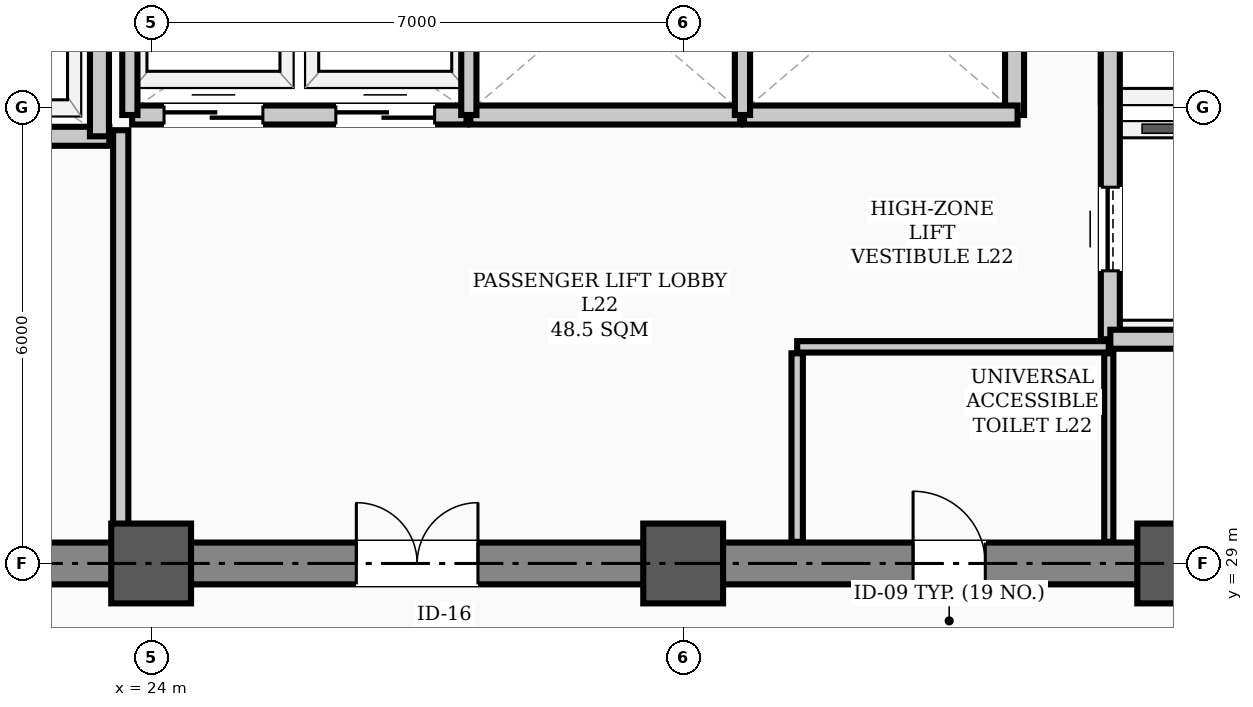
"""IFC4 building model, lengths in metres.
Left out: names, types, materials, properties, quantities, classifications, styles, units other than length and angle.
Written with IfcOpenShell. Run it as: python <this file> out.ifc"""

import sys

from ifc_helpers import new_model, si_unit, direction, frame, frame_2d, origin, origin_2d, place, context, subcontext, project, spatial, rectangle, hollow_rectangle, extrude, element, fill, save


model = new_model("IFC4")
c1 = context("Model", 3, precision=1e-05, world=origin(), true_north=direction((0.0, 1.0)))
c2 = subcontext(c1, "Body", "Model", "MODEL_VIEW")
j1 = project(units=[si_unit("LENGTHUNIT", "METRE"), si_unit("PLANEANGLEUNIT", "RADIAN")], contexts=[c1])
p1 = place(None, origin())
s1 = spatial("IfcSite", under=j1, at=p1, CompositionType="ELEMENT")
p2 = place(p1, origin())
s2 = spatial("IfcBuilding", under=s1, at=p2, CompositionType="ELEMENT")
p3 = place(p2, frame((0.0, 0.0, 88.9)))
s3 = spatial("IfcBuildingStorey", under=s2, at=p3, CompositionType="ELEMENT", Elevation=88.9)
for number, where, z_axis, x_axis in (
    (1, (24.0, 29.0, 0.0), (0.0, 0.0, 1.0), (1.0, 0.0, 0.0)),
    (2, (31.0, 29.0, 0.0), (0.0, 0.0, 1.0), (1.0, 0.0, 0.0)),
    (3, (37.5, 29.0, 0.0), (0.0, 0.0, 1.0), (1.0, 0.0, 0.0)),
):
    element("IfcColumn", number, at=place(p3, frame(where, z_axis=z_axis, x_axis=x_axis)), inside=s3, PredefinedType="COLUMN", context=c2, shape_type="SweptSolid", body=[
        extrude(hollow_rectangle(XDim=1.05, YDim=1.05, WallThickness=0.038, InnerFilletRadius=0.019, OuterFilletRadius=0.057, at=origin_2d()), origin(), (0.0, 0.0, 1.0), 3.9),
    ])
p4 = place(p3, frame((13.5, 29.0, 0.0), z_axis=(0.0, 0.0, 1.0), x_axis=(1.0, 0.0, 0.0)))
e4 = element("IfcWall", 4, at=p4, inside=s3, PredefinedType="SHEAR", context=c2, shape_type="SweptSolid", body=[
    extrude(rectangle(XDim=30.5, YDim=0.55, at=frame_2d((15.25, 0.0))), origin(), (0.0, 0.0, 1.0), 3.72),
])
p5 = place(p4, frame((1.75, 0.0, 0.0)))
e5 = element("IfcOpeningElement", 5, at=p5, cuts=e4, PredefinedType="OPENING", context=c2, shape_type="SweptSolid", body=[
    extrude(rectangle(XDim=1.1, YDim=2.08, at=frame_2d((0.55, 1.04))), frame((0.0, 0.285, 0.0), z_axis=(0.0, -1.0, 0.0), x_axis=(1.0, 0.0, 0.0)), (0.0, 0.0, 1.0), 0.57),
])
p6 = place(p4, frame((26.7, 0.0, 0.0)))
e6 = element("IfcOpeningElement", 6, at=p6, cuts=e4, PredefinedType="OPENING", context=c2, shape_type="SweptSolid", body=[
    extrude(rectangle(XDim=1.1, YDim=2.08, at=frame_2d((0.55, 1.04))), frame((0.0, 0.285, 0.0), z_axis=(0.0, -1.0, 0.0), x_axis=(1.0, 0.0, 0.0)), (0.0, 0.0, 1.0), 0.57),
])
p7 = place(p4, frame((6.8, 0.0, 0.0)))
e7 = element("IfcOpeningElement", 7, at=p7, cuts=e4, PredefinedType="OPENING", context=c2, shape_type="SweptSolid", body=[
    extrude(rectangle(XDim=1.1, YDim=2.08, at=frame_2d((0.55, 1.04))), frame((0.0, 0.285, 0.0), z_axis=(0.0, -1.0, 0.0), x_axis=(1.0, 0.0, 0.0)), (0.0, 0.0, 1.0), 0.57),
])
p8 = place(p4, frame((13.2, 0.0, 0.0)))
e8 = element("IfcOpeningElement", 8, at=p8, cuts=e4, PredefinedType="OPENING", context=c2, shape_type="SweptSolid", body=[
    extrude(rectangle(XDim=1.6, YDim=2.08, at=frame_2d((0.8, 1.04))), frame((0.0, 0.285, 0.0), z_axis=(0.0, -1.0, 0.0), x_axis=(1.0, 0.0, 0.0)), (0.0, 0.0, 1.0), 0.57),
])
p9 = place(p4, frame((20.525, 0.0, 0.0)))
e9 = element("IfcOpeningElement", 9, at=p9, cuts=e4, PredefinedType="OPENING", context=c2, shape_type="SweptSolid", body=[
    extrude(rectangle(XDim=0.95, YDim=2.08, at=frame_2d((0.475, 1.04))), frame((0.0, 0.285, 0.0), z_axis=(0.0, -1.0, 0.0), x_axis=(1.0, 0.0, 0.0)), (0.0, 0.0, 1.0), 0.57),
])
p10 = place(p3, frame((18.1, 34.62, 0.0), z_axis=(0.0, 0.0, 1.0), x_axis=(1.0, 0.0, 0.0)))
e10 = element("IfcWall", 10, at=p10, inside=s3, PredefinedType="STANDARD", context=c2, shape_type="SweptSolid", body=[
    extrude(rectangle(XDim=5.35, YDim=0.25, at=frame_2d((2.675, 0.0))), origin(), (0.0, 0.0, 1.0), 3.72),
])
p11 = place(p10, frame((0.85, 0.0, 0.0)))
e11 = element("IfcOpeningElement", 11, at=p11, cuts=e10, PredefinedType="OPENING", context=c2, shape_type="SweptSolid", body=[
    extrude(rectangle(XDim=1.1, YDim=2.08, at=frame_2d((0.55, 1.04))), frame((0.0, 0.135, 0.0), z_axis=(0.0, -1.0, 0.0), x_axis=(1.0, 0.0, 0.0)), (0.0, 0.0, 1.0), 0.27),
])
p12 = place(p10, frame((3.45, 0.0, 0.0)))
e12 = element("IfcOpeningElement", 12, at=p12, cuts=e10, PredefinedType="OPENING", context=c2, shape_type="SweptSolid", body=[
    extrude(rectangle(XDim=1.1, YDim=2.08, at=frame_2d((0.55, 1.04))), frame((0.0, 0.135, 0.0), z_axis=(0.0, -1.0, 0.0), x_axis=(1.0, 0.0, 0.0)), (0.0, 0.0, 1.0), 0.27),
])
p13 = place(p3, frame((36.62, 31.95, 0.0), z_axis=(0.0, 0.0, 1.0), x_axis=(0.0, 1.0, 0.0)))
e13 = element("IfcWall", 13, at=p13, inside=s3, PredefinedType="STANDARD", context=c2, shape_type="SweptSolid", body=[
    extrude(rectangle(XDim=6.0, YDim=0.25, at=frame_2d((3.0, 0.0))), origin(), (0.0, 0.0, 1.0), 3.3),
])
p14 = place(p13, frame((0.9, 0.0, 0.0)))
e14 = element("IfcOpeningElement", 14, at=p14, cuts=e13, PredefinedType="OPENING", context=c2, shape_type="SweptSolid", body=[
    extrude(rectangle(XDim=1.1, YDim=2.08, at=frame_2d((0.55, 1.04))), frame((0.0, 0.135, 0.0), z_axis=(0.0, -1.0, 0.0), x_axis=(1.0, 0.0, 0.0)), (0.0, 0.0, 1.0), 0.27),
])
p15 = place(p13, frame((4.0, 0.0, 0.0)))
e15 = element("IfcOpeningElement", 15, at=p15, cuts=e13, PredefinedType="OPENING", context=c2, shape_type="SweptSolid", body=[
    extrude(rectangle(XDim=1.1, YDim=2.08, at=frame_2d((0.55, 1.04))), frame((0.0, 0.135, 0.0), z_axis=(0.0, -1.0, 0.0), x_axis=(1.0, 0.0, 0.0)), (0.0, 0.0, 1.0), 0.27),
])
p16 = place(p3, frame((36.62, 31.95, 0.0), z_axis=(0.0, 0.0, 1.0), x_axis=(1.0, 0.0, 0.0)))
e16 = element("IfcWall", 16, at=p16, inside=s3, PredefinedType="STANDARD", context=c2, shape_type="SweptSolid", body=[
    extrude(rectangle(XDim=1.9, YDim=0.25, at=frame_2d((0.95, 0.0))), origin(), (0.0, 0.0, 1.0), 3.48),
])
p17 = place(p3, frame((23.32, 34.62, 0.0), z_axis=(0.0, 0.0, 1.0), x_axis=(0.0, 1.0, 0.0)))
e17 = element("IfcWall", 17, at=p17, inside=s3, PredefinedType="STANDARD", context=c2, shape_type="SweptSolid", body=[
    extrude(rectangle(XDim=3.33, YDim=0.25, at=frame_2d((1.665, 0.0))), origin(), (0.0, 0.0, 1.0), 3.3),
])
p18 = place(p3, frame((35.36, 34.9, 0.0), z_axis=(0.0, 0.0, 1.0), x_axis=(0.0, 1.0, 0.0)))
e18 = element("IfcWall", 18, at=p18, inside=s3, PredefinedType="STANDARD", context=c2, shape_type="SweptSolid", body=[
    extrude(rectangle(XDim=3.05, YDim=0.25, at=frame_2d((1.525, 0.0))), origin(), (0.0, 0.0, 1.0), 3.3),
])
p19 = place(p3, frame((23.75, 34.9, 0.0), z_axis=(0.0, 0.0, 1.0), x_axis=(1.0, 0.0, 0.0)))
e19 = element("IfcWall", 19, at=p19, inside=s3, PredefinedType="STANDARD", context=c2, shape_type="SweptSolid", body=[
    extrude(rectangle(XDim=4.4, YDim=0.25, at=frame_2d((2.2, 0.0))), origin(), (0.0, 0.0, 1.0), 3.72),
])
p20 = place(p19, frame((0.42, 0.0, 0.0)))
e20 = element("IfcOpeningElement", 20, at=p20, cuts=e19, PredefinedType="OPENING", context=c2, shape_type="SweptSolid", body=[
    extrude(rectangle(XDim=1.3, YDim=2.08, at=frame_2d((0.65, 1.04))), frame((0.0, 0.135, 0.0), z_axis=(0.0, -1.0, 0.0), x_axis=(1.0, 0.0, 0.0)), (0.0, 0.0, 1.0), 0.27),
])
p21 = place(p19, frame((2.68, 0.0, 0.0)))
e21 = element("IfcOpeningElement", 21, at=p21, cuts=e19, PredefinedType="OPENING", context=c2, shape_type="SweptSolid", body=[
    extrude(rectangle(XDim=1.3, YDim=2.08, at=frame_2d((0.65, 1.04))), frame((0.0, 0.135, 0.0), z_axis=(0.0, -1.0, 0.0), x_axis=(1.0, 0.0, 0.0)), (0.0, 0.0, 1.0), 0.27),
])
p22 = place(p3, frame((28.2, 34.9, 0.0), z_axis=(0.0, 0.0, 1.0), x_axis=(1.0, 0.0, 0.0)))
e22 = element("IfcWall", 22, at=p22, inside=s3, PredefinedType="STANDARD", context=c2, shape_type="SweptSolid", body=[
    extrude(rectangle(XDim=3.55, YDim=0.25, at=frame_2d((1.775, 0.0))), origin(), (0.0, 0.0, 1.0), 3.72),
])
p23 = place(p3, frame((31.8, 34.9, 0.0), z_axis=(0.0, 0.0, 1.0), x_axis=(1.0, 0.0, 0.0)))
e23 = element("IfcWall", 23, at=p23, inside=s3, PredefinedType="STANDARD", context=c2, shape_type="SweptSolid", body=[
    extrude(rectangle(XDim=3.6, YDim=0.25, at=frame_2d((1.8, 0.0))), origin(), (0.0, 0.0, 1.0), 3.72),
])
p24 = place(p3, frame((32.5, 31.85, 0.0), z_axis=(0.0, 0.0, 1.0), x_axis=(1.0, 0.0, 0.0)))
e24 = element("IfcWall", 24, at=p24, inside=s3, PredefinedType="PARTITIONING", context=c2, shape_type="SweptSolid", body=[
    extrude(rectangle(XDim=4.1, YDim=0.15, at=frame_2d((2.05, 0.0))), origin(), (0.0, 0.0, 1.0), 3.72),
])
p25 = place(p3, frame((23.6, 29.285, 0.0), z_axis=(0.0, 0.0, 1.0), x_axis=(0.0, 1.0, 0.0)))
e25 = element("IfcWall", 25, at=p25, inside=s3, PredefinedType="STANDARD", context=c2, shape_type="SweptSolid", body=[
    extrude(rectangle(XDim=5.415, YDim=0.2, at=frame_2d((2.708, 0.0))), origin(), (0.0, 0.0, 1.0), 3.1),
])
p26 = place(p3, frame((32.5, 29.285, 0.0), z_axis=(0.0, 0.0, 1.0), x_axis=(0.0, 1.0, 0.0)))
e26 = element("IfcWall", 26, at=p26, inside=s3, PredefinedType="PARTITIONING", context=c2, shape_type="SweptSolid", body=[
    extrude(rectangle(XDim=2.48, YDim=0.15, at=frame_2d((1.24, 0.0))), origin(), (0.0, 0.0, 1.0), 3.3),
])
p27 = place(p3, frame((36.6, 29.285, 0.0), z_axis=(0.0, 0.0, 1.0), x_axis=(0.0, 1.0, 0.0)))
e27 = element("IfcWall", 27, at=p27, inside=s3, PredefinedType="PARTITIONING", context=c2, shape_type="SweptSolid", body=[
    extrude(rectangle(XDim=2.48, YDim=0.12, at=frame_2d((1.24, 0.0))), origin(), (0.0, 0.0, 1.0), 3.3),
])
p28 = place(p3, frame((23.72, 34.9, 0.0), z_axis=(0.0, 0.0, 1.0), x_axis=(0.0, 1.0, 0.0)))
e28 = element("IfcWall", 28, at=p28, inside=s3, PredefinedType="STANDARD", context=c2, shape_type="SweptSolid", body=[
    extrude(rectangle(XDim=3.12, YDim=0.2, at=frame_2d((1.56, 0.0))), origin(), (0.0, 0.0, 1.0), 3.1),
])
for number, where, z_axis, x_axis in (
    (29, (28.18, 34.9, 0.0), (0.0, 0.0, 1.0), (0.0, 1.0, 0.0)),
    (30, (31.78, 34.9, 0.0), (0.0, 0.0, 1.0), (0.0, 1.0, 0.0)),
):
    element("IfcWall", number, at=place(p3, frame(where, z_axis=z_axis, x_axis=x_axis)), inside=s3, PredefinedType="STANDARD", context=c2, shape_type="SweptSolid", body=[
        extrude(rectangle(XDim=3.12, YDim=0.2, at=frame_2d((1.56, 0.0))), origin(), (0.0, 0.0, 1.0), 3.3),
    ])
p29 = place(p8, origin())
e31 = element("IfcDoor", 31, at=p29, inside=s3, OperationType="DOUBLE_DOOR_SINGLE_SWING", PredefinedType="DOOR", context=c2, shape_type="SweptSolid", body=[
    extrude(rectangle(XDim=1.6, YDim=2.08, at=frame_2d((0.8, 1.04))), frame((0.0, 0.025, 0.0), z_axis=(0.0, -1.0, 0.0), x_axis=(1.0, 0.0, 0.0)), (0.0, 0.0, 1.0), 0.05),
])
fill(e8, e31)
p30 = place(p9, origin())
e32 = element("IfcDoor", 32, at=p30, inside=s3, OperationType="SINGLE_SWING_LEFT", PredefinedType="DOOR", context=c2, shape_type="SweptSolid", body=[
    extrude(rectangle(XDim=0.95, YDim=2.08, at=frame_2d((0.475, 1.04))), frame((0.0, 0.025, 0.0), z_axis=(0.0, -1.0, 0.0), x_axis=(1.0, 0.0, 0.0)), (0.0, 0.0, 1.0), 0.05),
])
fill(e9, e32)
p31 = place(p14, origin())
e33 = element("IfcDoor", 33, at=p31, inside=s3, OperationType="SLIDING_TO_LEFT", PredefinedType="DOOR", context=c2, shape_type="SweptSolid", body=[
    extrude(rectangle(XDim=1.1, YDim=2.08, at=frame_2d((0.55, 1.04))), frame((0.0, 0.025, 0.0), z_axis=(0.0, -1.0, 0.0), x_axis=(1.0, 0.0, 0.0)), (0.0, 0.0, 1.0), 0.05),
])
fill(e14, e33)
p32 = place(p20, origin())
e34 = element("IfcDoor", 34, at=p32, inside=s3, OperationType="DOUBLE_DOOR_SLIDING", PredefinedType="DOOR", context=c2, shape_type="SweptSolid", body=[
    extrude(rectangle(XDim=1.3, YDim=2.08, at=frame_2d((0.65, 1.04))), frame((0.0, 0.025, 0.0), z_axis=(0.0, -1.0, 0.0), x_axis=(1.0, 0.0, 0.0)), (0.0, 0.0, 1.0), 0.05),
])
fill(e20, e34)
p33 = place(p21, origin())
e35 = element("IfcDoor", 35, at=p33, inside=s3, OperationType="DOUBLE_DOOR_SLIDING", PredefinedType="DOOR", context=c2, shape_type="SweptSolid", body=[
    extrude(rectangle(XDim=1.3, YDim=2.08, at=frame_2d((0.65, 1.04))), frame((0.0, 0.025, 0.0), z_axis=(0.0, -1.0, 0.0), x_axis=(1.0, 0.0, 0.0)), (0.0, 0.0, 1.0), 0.05),
])
fill(e21, e35)
save(model, sys.argv[1])
